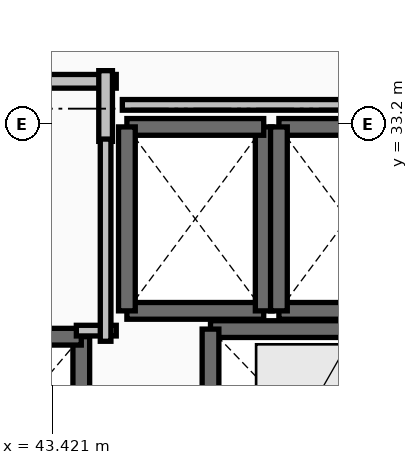
"""IFC4 building model, lengths in metres.
Left out: names, types, materials, properties, quantities, classifications, styles, units other than length and angle.
Written with IfcOpenShell. Run it as: python <this file> out.ifc"""

import sys

from ifc_helpers import new_model, si_unit, direction, frame, frame_2d, origin, place, context, subcontext, project, spatial, rectangle, extrude, element, save


model = new_model("IFC4")
c1 = context("Model", 3, precision=1e-05, world=origin(), true_north=direction((0.0, 1.0)))
c2 = subcontext(c1, "Body", "Model", "MODEL_VIEW")
j1 = project(units=[si_unit("LENGTHUNIT", "METRE"), si_unit("PLANEANGLEUNIT", "RADIAN")], contexts=[c1])
p1 = place(None, origin())
s1 = spatial("IfcSite", under=j1, at=p1, CompositionType="ELEMENT")
p2 = place(p1, origin())
s2 = spatial("IfcBuilding", under=s1, at=p2, CompositionType="ELEMENT")
p3 = place(p2, frame((0.0, 0.0, 120.8)))
s3 = spatial("IfcBuildingStorey", under=s2, at=p3, CompositionType="ELEMENT", Elevation=120.8)
p4 = place(p3, frame((43.8, 27.8, 0.0), z_axis=(0.0, 0.0, 1.0), x_axis=(0.0, 1.0, 0.0)))
e1 = element("IfcWall", 1, at=p4, inside=s3, PredefinedType="SOLIDWALL", context=c2, shape_type="SweptSolid", body=[
    extrude(rectangle(XDim=2.6, YDim=0.22, at=frame_2d((1.3, 0.0))), origin(), (0.0, 0.0, 1.0), 3.15),
])
p5 = place(p3, frame((43.8, 30.4, 0.0), z_axis=(0.0, 0.0, 1.0), x_axis=(-1.0, 0.0, 0.0)))
e2 = element("IfcWall", 2, at=p5, inside=s3, PredefinedType="SOLIDWALL", context=c2, shape_type="SweptSolid", body=[
    extrude(rectangle(XDim=2.2, YDim=0.22, at=frame_2d((1.1, 0.0))), origin(), (0.0, 0.0, 1.0), 3.15),
])
p6 = place(p3, frame((44.4, 30.74, 0.0), z_axis=(0.0, 0.0, 1.0), x_axis=(1.0, 0.0, 0.0)))
e3 = element("IfcWall", 3, at=p6, inside=s3, PredefinedType="SOLIDWALL", context=c2, shape_type="SweptSolid", body=[
    extrude(rectangle(XDim=1.8, YDim=0.22, at=frame_2d((0.9, 0.0))), origin(), (0.0, 0.0, 1.0), 3.15),
])
p7 = place(p3, frame((46.2, 30.74, 0.0), z_axis=(0.0, 0.0, 1.0), x_axis=(0.0, 1.0, 0.0)))
e4 = element("IfcWall", 4, at=p7, inside=s3, PredefinedType="SOLIDWALL", context=c2, shape_type="SweptSolid", body=[
    extrude(rectangle(XDim=2.42, YDim=0.22, at=frame_2d((1.21, 0.0))), origin(), (0.0, 0.0, 1.0), 3.15),
])
p8 = place(p3, frame((46.2, 33.16, 0.0), z_axis=(0.0, 0.0, 1.0), x_axis=(-1.0, 0.0, 0.0)))
e5 = element("IfcWall", 5, at=p8, inside=s3, PredefinedType="SOLIDWALL", context=c2, shape_type="SweptSolid", body=[
    extrude(rectangle(XDim=1.8, YDim=0.22, at=frame_2d((0.9, 0.0))), origin(), (0.0, 0.0, 1.0), 3.15),
])
p9 = place(p3, frame((44.4, 33.16, 0.0), z_axis=(0.0, 0.0, 1.0), x_axis=(0.0, -1.0, 0.0)))
e6 = element("IfcWall", 6, at=p9, inside=s3, PredefinedType="SOLIDWALL", context=c2, shape_type="SweptSolid", body=[
    extrude(rectangle(XDim=2.42, YDim=0.22, at=frame_2d((1.21, 0.0))), origin(), (0.0, 0.0, 1.0), 3.15),
])
for number, where, z_axis, x_axis in (
    (7, (46.4, 30.74, 0.0), (0.0, 0.0, 1.0), (1.0, 0.0, 0.0)),
    (8, (48.2, 33.16, 0.0), (0.0, 0.0, 1.0), (-1.0, 0.0, 0.0)),
):
    element("IfcWall", number, at=place(p3, frame(where, z_axis=z_axis, x_axis=x_axis)), inside=s3, PredefinedType="SOLIDWALL", context=c2, shape_type="SweptSolid", body=[
        extrude(rectangle(XDim=1.8, YDim=0.22, at=frame_2d((0.9, 0.0))), origin(), (0.0, 0.0, 1.0), 3.15),
    ])
p10 = place(p3, frame((46.4, 33.16, 0.0), z_axis=(0.0, 0.0, 1.0), x_axis=(0.0, -1.0, 0.0)))
e9 = element("IfcWall", 9, at=p10, inside=s3, PredefinedType="SOLIDWALL", context=c2, shape_type="SweptSolid", body=[
    extrude(rectangle(XDim=2.42, YDim=0.22, at=frame_2d((1.21, 0.0))), origin(), (0.0, 0.0, 1.0), 3.15),
])
p11 = place(p3, frame((47.9, 30.5, 0.0), z_axis=(0.0, 0.0, 1.0), x_axis=(-1.0, 0.0, 0.0)))
e10 = element("IfcWall", 10, at=p11, inside=s3, PredefinedType="SHEAR", context=c2, shape_type="SweptSolid", body=[
    extrude(rectangle(XDim=2.4, YDim=0.22, at=frame_2d((1.2, 0.0))), origin(), (0.0, 0.0, 1.0), 3.15),
])
p12 = place(p3, frame((45.5, 30.5, 0.0), z_axis=(0.0, 0.0, 1.0), x_axis=(0.0, -1.0, 0.0)))
e11 = element("IfcWall", 11, at=p12, inside=s3, PredefinedType="SHEAR", context=c2, shape_type="SweptSolid", body=[
    extrude(rectangle(XDim=2.5, YDim=0.22, at=frame_2d((1.25, 0.0))), origin(), (0.0, 0.0, 1.0), 3.15),
])
p13 = place(p3, frame((44.26, 33.76, 0.0), z_axis=(0.0, 0.0, 1.0), x_axis=(-1.0, 0.0, 0.0)))
e12 = element("IfcWall", 12, at=p13, inside=s3, PredefinedType="PARTITIONING", context=c2, shape_type="SweptSolid", body=[
    extrude(rectangle(XDim=6.91, YDim=0.18, at=frame_2d((3.455, 0.0))), origin(), (0.0, 0.0, 1.0), 3.15),
])
p14 = place(p13, frame((3.03, 0.0, 0.0)))
e13 = element("IfcOpeningElement", 13, at=p14, cuts=e12, PredefinedType="OPENING", context=c2, shape_type="SweptSolid", body=[
    extrude(rectangle(XDim=0.85, YDim=2.1, at=frame_2d((0.425, 1.05))), frame((0.0, 0.105, 0.0), z_axis=(0.0, -1.0, 0.0), x_axis=(1.0, 0.0, 0.0)), (0.0, 0.0, 1.0), 0.21),
])
p15 = place(p3, frame((44.12, 32.97, 0.0), z_axis=(0.0, 0.0, 1.0), x_axis=(0.0, 1.0, 0.0)))
e14 = element("IfcWall", 14, at=p15, inside=s3, PredefinedType="PARTITIONING", context=c2, shape_type="SweptSolid", body=[
    extrude(rectangle(XDim=0.93, YDim=0.18, at=frame_2d((0.465, 0.0))), origin(), (0.0, 0.0, 1.0), 3.15),
])
p16 = place(p3, frame((43.735, 30.48, 0.0), z_axis=(0.0, 0.0, 1.0), x_axis=(1.0, 0.0, 0.0)))
e15 = element("IfcWall", 15, at=p16, inside=s3, PredefinedType="PARTITIONING", context=c2, shape_type="SweptSolid", body=[
    extrude(rectangle(XDim=0.525, YDim=0.14, at=frame_2d((0.262, 0.0))), origin(), (0.0, 0.0, 1.0), 3.15),
])
p17 = place(p3, frame((44.12, 30.34, 0.0), z_axis=(0.0, 0.0, 1.0), x_axis=(0.0, 1.0, 0.0)))
e16 = element("IfcWall", 16, at=p17, inside=s3, PredefinedType="PARTITIONING", context=c2, shape_type="SweptSolid", body=[
    extrude(rectangle(XDim=2.66, YDim=0.14, at=frame_2d((1.33, 0.0))), origin(), (0.0, 0.0, 1.0), 3.15),
])
p18 = place(p3, frame((44.34, 33.45, 0.0), z_axis=(0.0, 0.0, 1.0), x_axis=(1.0, 0.0, 0.0)))
e17 = element("IfcWall", 17, at=p18, inside=s3, PredefinedType="PARTITIONING", context=c2, shape_type="SweptSolid", body=[
    extrude(rectangle(XDim=4.21, YDim=0.14, at=frame_2d((2.105, 0.0))), origin(), (0.0, 0.0, 1.0), 2.342),
])
save(model, sys.argv[1])
